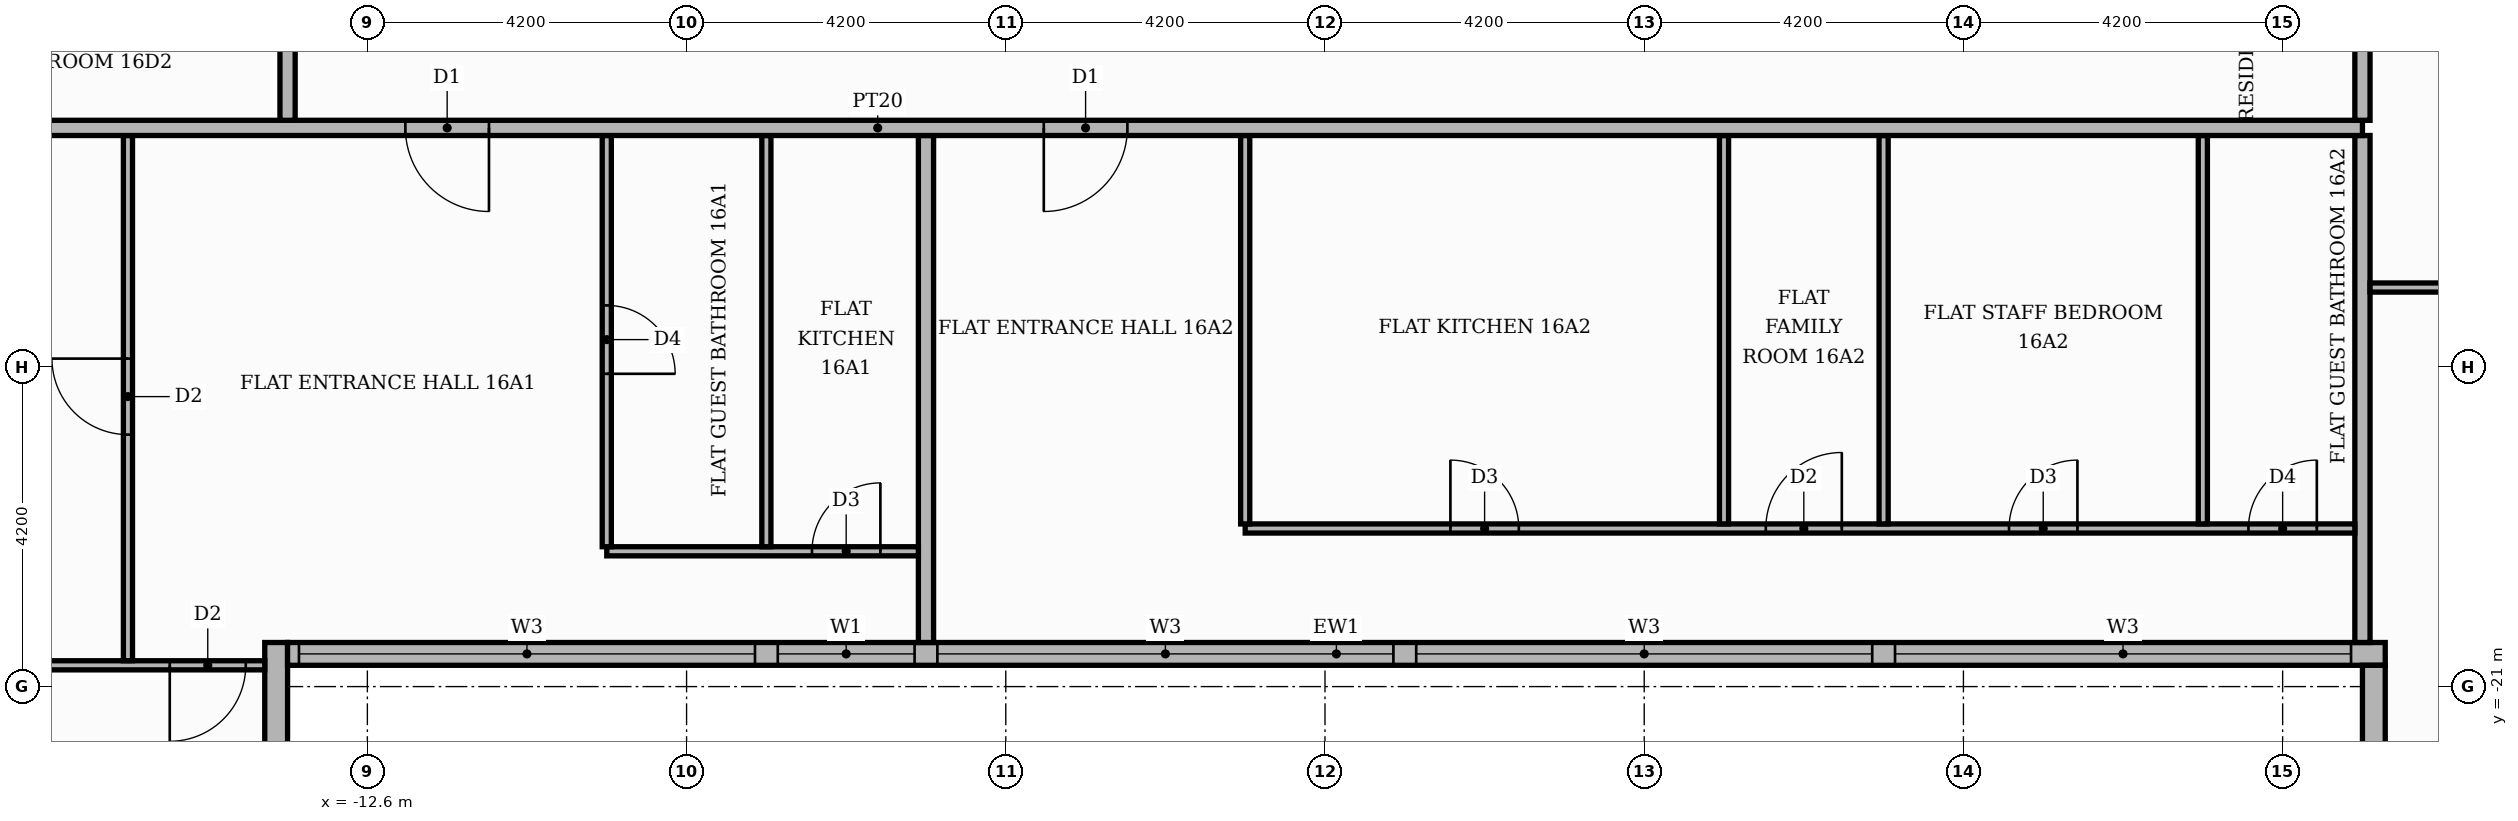
"""IFC4 building model, lengths in metres.
Left out: names, types, materials, properties, quantities, classifications, styles, units other than length and angle.
Written with IfcOpenShell. Run it as: python <this file> out.ifc"""

import sys

from ifc_helpers import new_model, si_unit, direction, frame, frame_2d, origin, place, context, subcontext, project, spatial, rectangle, extrude, element, fill, save


model = new_model("IFC4")
c1 = context("Model", 3, precision=1e-05, world=origin(), true_north=direction((0.0, 1.0)))
c2 = subcontext(c1, "Body", "Model", "MODEL_VIEW")
j1 = project(units=[si_unit("LENGTHUNIT", "METRE"), si_unit("PLANEANGLEUNIT", "RADIAN")], contexts=[c1])
p1 = place(None, origin())
s1 = spatial("IfcSite", under=j1, at=p1, CompositionType="ELEMENT")
p2 = place(p1, origin())
s2 = spatial("IfcBuilding", under=s1, at=p2, CompositionType="ELEMENT")
p3 = place(p2, frame((0.0, 0.0, 69.9)))
s3 = spatial("IfcBuildingStorey", under=s2, at=p3, CompositionType="ELEMENT", Elevation=69.9)
p4 = place(p3, frame((-13.8, -25.42, 0.0), z_axis=(0.0, 0.0, 1.0), x_axis=(0.0, 1.0, 0.0)))
e1 = element("IfcWall", 1, at=p4, inside=s3, PredefinedType="STANDARD", context=c2, shape_type="SweptSolid", body=[
    extrude(rectangle(XDim=5.0, YDim=0.3, at=frame_2d((2.5, 0.0))), origin(), (0.0, 0.0, 1.0), 3.4),
])
p5 = place(p4, frame((1.42, 0.0, 0.9)))
e2 = element("IfcOpeningElement", 2, at=p5, cuts=e1, PredefinedType="OPENING", context=c2, shape_type="SweptSolid", body=[
    extrude(rectangle(XDim=1.8, YDim=2.1, at=frame_2d((0.9, 1.05))), frame((0.0, 0.16, 0.0), z_axis=(0.0, -1.0, 0.0), x_axis=(1.0, 0.0, 0.0)), (0.0, 0.0, 1.0), 0.32),
])
p6 = place(p3, frame((-13.65, -20.57, 0.0), z_axis=(0.0, 0.0, 1.0), x_axis=(1.0, 0.0, 0.0)))
e3 = element("IfcWall", 3, at=p6, inside=s3, PredefinedType="STANDARD", context=c2, shape_type="SweptSolid", body=[
    extrude(rectangle(XDim=27.6, YDim=0.3, at=frame_2d((13.8, 0.0))), origin(), (0.0, 0.0, 1.0), 3.4),
])
p7 = place(p6, frame((0.15, 0.0, 0.9)))
e4 = element("IfcOpeningElement", 4, at=p7, cuts=e3, PredefinedType="OPENING", context=c2, shape_type="SweptSolid", body=[
    extrude(rectangle(XDim=6.0, YDim=2.1, at=frame_2d((3.0, 1.05))), frame((0.0, 0.16, 0.0), z_axis=(0.0, -1.0, 0.0), x_axis=(1.0, 0.0, 0.0)), (0.0, 0.0, 1.0), 0.32),
])
p8 = place(p6, frame((6.45, 0.0, 0.9)))
e5 = element("IfcOpeningElement", 5, at=p8, cuts=e3, PredefinedType="OPENING", context=c2, shape_type="SweptSolid", body=[
    extrude(rectangle(XDim=1.8, YDim=2.1, at=frame_2d((0.9, 1.05))), frame((0.0, 0.16, 0.0), z_axis=(0.0, -1.0, 0.0), x_axis=(1.0, 0.0, 0.0)), (0.0, 0.0, 1.0), 0.32),
])
p9 = place(p6, frame((8.55, 0.0, 0.9)))
e6 = element("IfcOpeningElement", 6, at=p9, cuts=e3, PredefinedType="OPENING", context=c2, shape_type="SweptSolid", body=[
    extrude(rectangle(XDim=6.0, YDim=2.1, at=frame_2d((3.0, 1.05))), frame((0.0, 0.16, 0.0), z_axis=(0.0, -1.0, 0.0), x_axis=(1.0, 0.0, 0.0)), (0.0, 0.0, 1.0), 0.32),
])
p10 = place(p6, frame((14.85, 0.0, 0.9)))
e7 = element("IfcOpeningElement", 7, at=p10, cuts=e3, PredefinedType="OPENING", context=c2, shape_type="SweptSolid", body=[
    extrude(rectangle(XDim=6.0, YDim=2.1, at=frame_2d((3.0, 1.05))), frame((0.0, 0.16, 0.0), z_axis=(0.0, -1.0, 0.0), x_axis=(1.0, 0.0, 0.0)), (0.0, 0.0, 1.0), 0.32),
])
p11 = place(p6, frame((21.15, 0.0, 0.9)))
e8 = element("IfcOpeningElement", 8, at=p11, cuts=e3, PredefinedType="OPENING", context=c2, shape_type="SweptSolid", body=[
    extrude(rectangle(XDim=6.0, YDim=2.1, at=frame_2d((3.0, 1.05))), frame((0.0, 0.16, 0.0), z_axis=(0.0, -1.0, 0.0), x_axis=(1.0, 0.0, 0.0)), (0.0, 0.0, 1.0), 0.32),
])
p12 = place(p3, frame((13.8, -20.72, 0.0), z_axis=(0.0, 0.0, 1.0), x_axis=(0.0, -1.0, 0.0)))
e9 = element("IfcWall", 9, at=p12, inside=s3, PredefinedType="STANDARD", context=c2, shape_type="SweptSolid", body=[
    extrude(rectangle(XDim=5.0, YDim=0.3, at=frame_2d((2.5, 0.0))), origin(), (0.0, 0.0, 1.0), 3.4),
])
p13 = place(p12, frame((1.48, 0.0, 0.9)))
e10 = element("IfcOpeningElement", 10, at=p13, cuts=e9, PredefinedType="OPENING", context=c2, shape_type="SweptSolid", body=[
    extrude(rectangle(XDim=1.8, YDim=2.1, at=frame_2d((0.9, 1.05))), frame((0.0, 0.16, 0.0), z_axis=(0.0, -1.0, 0.0), x_axis=(1.0, 0.0, 0.0)), (0.0, 0.0, 1.0), 0.32),
])
p14 = place(p3, frame((-25.42, -20.72, 0.0), z_axis=(0.0, 0.0, 1.0), x_axis=(1.0, 0.0, 0.0)))
e11 = element("IfcWall", 11, at=p14, inside=s3, PredefinedType="PARTITIONING", context=c2, shape_type="SweptSolid", body=[
    extrude(rectangle(XDim=11.47, YDim=0.12, at=frame_2d((5.735, 0.0))), origin(), (0.0, 0.0, 1.0), 3.4),
])
p15 = place(p14, frame((10.22, 0.0, 0.0)))
e12 = element("IfcOpeningElement", 12, at=p15, cuts=e11, PredefinedType="OPENING", context=c2, shape_type="SweptSolid", body=[
    extrude(rectangle(XDim=1.0, YDim=2.1, at=frame_2d((0.5, 1.05))), frame((0.0, 0.07, 0.0), z_axis=(0.0, -1.0, 0.0), x_axis=(1.0, 0.0, 0.0)), (0.0, 0.0, 1.0), 0.14),
])
for number, where, z_axis, x_axis in (
    (13, (-5.25, -20.42, 0.0), (0.0, 0.0, 1.0), (0.0, 1.0, 0.0)),
    (14, (13.65, -20.42, 0.0), (0.0, 0.0, 1.0), (0.0, 1.0, 0.0)),
):
    element("IfcWall", number, at=place(p3, frame(where, z_axis=z_axis, x_axis=x_axis)), inside=s3, PredefinedType="PARTITIONING", context=c2, shape_type="SweptSolid", body=[
        extrude(rectangle(XDim=6.67, YDim=0.2, at=frame_2d((3.335, 0.0))), origin(), (0.0, 0.0, 1.0), 3.4),
    ])
p16 = place(p3, frame((-15.75, -20.66, 0.0), z_axis=(0.0, 0.0, 1.0), x_axis=(0.0, 1.0, 0.0)))
e15 = element("IfcWall", 15, at=p16, inside=s3, PredefinedType="PARTITIONING", context=c2, shape_type="SweptSolid", body=[
    extrude(rectangle(XDim=6.91, YDim=0.12, at=frame_2d((3.455, 0.0))), origin(), (0.0, 0.0, 1.0), 3.4),
])
p17 = place(p16, frame((2.975, 0.0, 0.0)))
e16 = element("IfcOpeningElement", 16, at=p17, cuts=e15, PredefinedType="OPENING", context=c2, shape_type="SweptSolid", body=[
    extrude(rectangle(XDim=1.0, YDim=2.1, at=frame_2d((0.5, 1.05))), frame((0.0, 0.07, 0.0), z_axis=(0.0, -1.0, 0.0), x_axis=(1.0, 0.0, 0.0)), (0.0, 0.0, 1.0), 0.14),
])
p18 = place(p3, frame((-9.45, -19.22, 0.0), z_axis=(0.0, 0.0, 1.0), x_axis=(1.0, 0.0, 0.0)))
e17 = element("IfcWall", 17, at=p18, inside=s3, PredefinedType="PARTITIONING", context=c2, shape_type="SweptSolid", body=[
    extrude(rectangle(XDim=4.1, YDim=0.12, at=frame_2d((2.05, 0.0))), origin(), (0.0, 0.0, 1.0), 3.4),
])
p19 = place(p18, frame((2.7, 0.0, 0.0)))
e18 = element("IfcOpeningElement", 18, at=p19, cuts=e17, PredefinedType="OPENING", context=c2, shape_type="SweptSolid", body=[
    extrude(rectangle(XDim=0.9, YDim=2.1, at=frame_2d((0.45, 1.05))), frame((0.0, 0.07, 0.0), z_axis=(0.0, -1.0, 0.0), x_axis=(1.0, 0.0, 0.0)), (0.0, 0.0, 1.0), 0.14),
])
p20 = place(p3, frame((-9.45, -19.16, 0.0), z_axis=(0.0, 0.0, 1.0), x_axis=(0.0, 1.0, 0.0)))
e19 = element("IfcWall", 19, at=p20, inside=s3, PredefinedType="PARTITIONING", context=c2, shape_type="SweptSolid", body=[
    extrude(rectangle(XDim=5.41, YDim=0.12, at=frame_2d((2.705, 0.0))), origin(), (0.0, 0.0, 1.0), 3.4),
])
p21 = place(p20, frame((2.275, 0.0, 0.0)))
e20 = element("IfcOpeningElement", 20, at=p21, cuts=e19, PredefinedType="OPENING", context=c2, shape_type="SweptSolid", body=[
    extrude(rectangle(XDim=0.9, YDim=2.1, at=frame_2d((0.45, 1.05))), frame((0.0, 0.07, 0.0), z_axis=(0.0, -1.0, 0.0), x_axis=(1.0, 0.0, 0.0)), (0.0, 0.0, 1.0), 0.14),
])
p22 = place(p3, frame((-7.35, -19.16, 0.0), z_axis=(0.0, 0.0, 1.0), x_axis=(0.0, 1.0, 0.0)))
e21 = element("IfcWall", 21, at=p22, inside=s3, PredefinedType="PARTITIONING", context=c2, shape_type="SweptSolid", body=[
    extrude(rectangle(XDim=5.41, YDim=0.12, at=frame_2d((2.705, 0.0))), origin(), (0.0, 0.0, 1.0), 3.4),
])
p23 = place(p3, frame((-1.05, -18.92, 0.0), z_axis=(0.0, 0.0, 1.0), x_axis=(1.0, 0.0, 0.0)))
e22 = element("IfcWall", 22, at=p23, inside=s3, PredefinedType="PARTITIONING", context=c2, shape_type="SweptSolid", body=[
    extrude(rectangle(XDim=14.6, YDim=0.12, at=frame_2d((7.3, 0.0))), origin(), (0.0, 0.0, 1.0), 3.4),
])
p24 = place(p23, frame((2.7, 0.0, 0.0)))
e23 = element("IfcOpeningElement", 23, at=p24, cuts=e22, PredefinedType="OPENING", context=c2, shape_type="SweptSolid", body=[
    extrude(rectangle(XDim=0.9, YDim=2.1, at=frame_2d((0.45, 1.05))), frame((0.0, 0.07, 0.0), z_axis=(0.0, -1.0, 0.0), x_axis=(1.0, 0.0, 0.0)), (0.0, 0.0, 1.0), 0.14),
])
p25 = place(p23, frame((6.85, 0.0, 0.0)))
e24 = element("IfcOpeningElement", 24, at=p25, cuts=e22, PredefinedType="OPENING", context=c2, shape_type="SweptSolid", body=[
    extrude(rectangle(XDim=1.0, YDim=2.1, at=frame_2d((0.5, 1.05))), frame((0.0, 0.07, 0.0), z_axis=(0.0, -1.0, 0.0), x_axis=(1.0, 0.0, 0.0)), (0.0, 0.0, 1.0), 0.14),
])
p26 = place(p23, frame((10.05, 0.0, 0.0)))
e25 = element("IfcOpeningElement", 25, at=p26, cuts=e22, PredefinedType="OPENING", context=c2, shape_type="SweptSolid", body=[
    extrude(rectangle(XDim=0.9, YDim=2.1, at=frame_2d((0.45, 1.05))), frame((0.0, 0.07, 0.0), z_axis=(0.0, -1.0, 0.0), x_axis=(1.0, 0.0, 0.0)), (0.0, 0.0, 1.0), 0.14),
])
p27 = place(p23, frame((13.2, 0.0, 0.0)))
e26 = element("IfcOpeningElement", 26, at=p27, cuts=e22, PredefinedType="OPENING", context=c2, shape_type="SweptSolid", body=[
    extrude(rectangle(XDim=0.9, YDim=2.1, at=frame_2d((0.45, 1.05))), frame((0.0, 0.07, 0.0), z_axis=(0.0, -1.0, 0.0), x_axis=(1.0, 0.0, 0.0)), (0.0, 0.0, 1.0), 0.14),
])
for number, where, z_axis, x_axis in (
    (27, (-1.05, -18.86, 0.0), (0.0, 0.0, 1.0), (0.0, 1.0, 0.0)),
    (28, (5.25, -18.86, 0.0), (0.0, 0.0, 1.0), (0.0, 1.0, 0.0)),
    (29, (7.35, -18.86, 0.0), (0.0, 0.0, 1.0), (0.0, 1.0, 0.0)),
    (30, (11.55, -18.86, 0.0), (0.0, 0.0, 1.0), (0.0, 1.0, 0.0)),
):
    element("IfcWall", number, at=place(p3, frame(where, z_axis=z_axis, x_axis=x_axis)), inside=s3, PredefinedType="PARTITIONING", context=c2, shape_type="SweptSolid", body=[
        extrude(rectangle(XDim=5.11, YDim=0.12, at=frame_2d((2.555, 0.0))), origin(), (0.0, 0.0, 1.0), 3.4),
    ])
p28 = place(p3, frame((13.75, -15.75, 0.0), z_axis=(0.0, 0.0, 1.0), x_axis=(1.0, 0.0, 0.0)))
e31 = element("IfcWall", 31, at=p28, inside=s3, PredefinedType="PARTITIONING", context=c2, shape_type="SweptSolid", body=[
    extrude(rectangle(XDim=6.07, YDim=0.12, at=frame_2d((3.035, 0.0))), origin(), (0.0, 0.0, 1.0), 3.4),
])
p29 = place(p28, frame((2.485, 0.0, 0.0)))
e32 = element("IfcOpeningElement", 32, at=p29, cuts=e31, PredefinedType="OPENING", context=c2, shape_type="SweptSolid", body=[
    extrude(rectangle(XDim=1.0, YDim=2.1, at=frame_2d((0.5, 1.05))), frame((0.0, 0.07, 0.0), z_axis=(0.0, -1.0, 0.0), x_axis=(1.0, 0.0, 0.0)), (0.0, 0.0, 1.0), 0.14),
])
p30 = place(p3, frame((-25.42, -13.65, 0.0), z_axis=(0.0, 0.0, 1.0), x_axis=(1.0, 0.0, 0.0)))
e33 = element("IfcWall", 33, at=p30, inside=s3, PredefinedType="PARTITIONING", context=c2, shape_type="SweptSolid", body=[
    extrude(rectangle(XDim=39.07, YDim=0.2, at=frame_2d((19.535, 0.0))), origin(), (0.0, 0.0, 1.0), 3.4),
])
p31 = place(p30, frame((13.32, 0.0, 0.0)))
e34 = element("IfcOpeningElement", 34, at=p31, cuts=e33, PredefinedType="OPENING", context=c2, shape_type="SweptSolid", body=[
    extrude(rectangle(XDim=1.1, YDim=2.4, at=frame_2d((0.55, 1.2))), frame((0.0, 0.11, 0.0), z_axis=(0.0, -1.0, 0.0), x_axis=(1.0, 0.0, 0.0)), (0.0, 0.0, 1.0), 0.22),
])
p32 = place(p30, frame((21.72, 0.0, 0.0)))
e35 = element("IfcOpeningElement", 35, at=p32, cuts=e33, PredefinedType="OPENING", context=c2, shape_type="SweptSolid", body=[
    extrude(rectangle(XDim=1.1, YDim=2.4, at=frame_2d((0.55, 1.2))), frame((0.0, 0.11, 0.0), z_axis=(0.0, -1.0, 0.0), x_axis=(1.0, 0.0, 0.0)), (0.0, 0.0, 1.0), 0.22),
])
p33 = place(p3, frame((-13.65, -13.55, 0.0), z_axis=(0.0, 0.0, 1.0), x_axis=(0.0, 1.0, 0.0)))
e36 = element("IfcWall", 36, at=p33, inside=s3, PredefinedType="PARTITIONING", context=c2, shape_type="SweptSolid", body=[
    extrude(rectangle(XDim=18.7, YDim=0.2, at=frame_2d((9.35, 0.0))), origin(), (0.0, 0.0, 1.0), 3.4),
])
p34 = place(p33, frame((11.95, 0.0, 0.0)))
e37 = element("IfcOpeningElement", 37, at=p34, cuts=e36, PredefinedType="OPENING", context=c2, shape_type="SweptSolid", body=[
    extrude(rectangle(XDim=1.1, YDim=2.4, at=frame_2d((0.55, 1.2))), frame((0.0, 0.11, 0.0), z_axis=(0.0, -1.0, 0.0), x_axis=(1.0, 0.0, 0.0)), (0.0, 0.0, 1.0), 0.22),
])
p35 = place(p3, frame((13.65, -13.55, 0.0), z_axis=(0.0, 0.0, 1.0), x_axis=(0.0, 1.0, 0.0)))
e38 = element("IfcWall", 38, at=p35, inside=s3, PredefinedType="PARTITIONING", context=c2, shape_type="SweptSolid", body=[
    extrude(rectangle(XDim=8.2, YDim=0.2, at=frame_2d((4.1, 0.0))), origin(), (0.0, 0.0, 1.0), 3.4),
])
p36 = place(p35, frame((1.45, 0.0, 0.0)))
e39 = element("IfcOpeningElement", 39, at=p36, cuts=e38, PredefinedType="OPENING", context=c2, shape_type="SweptSolid", body=[
    extrude(rectangle(XDim=1.1, YDim=2.4, at=frame_2d((0.55, 1.2))), frame((0.0, 0.11, 0.0), z_axis=(0.0, -1.0, 0.0), x_axis=(1.0, 0.0, 0.0)), (0.0, 0.0, 1.0), 0.22),
])
p37 = place(p7, origin())
e40 = element("IfcWindow", 40, at=p37, inside=s3, PartitioningType="SINGLE_PANEL", PredefinedType="WINDOW", context=c2, shape_type="SweptSolid", body=[
    extrude(rectangle(XDim=6.0, YDim=2.1, at=frame_2d((3.0, 1.05))), frame((0.0, 0.03, 0.0), z_axis=(0.0, -1.0, 0.0), x_axis=(1.0, 0.0, 0.0)), (0.0, 0.0, 1.0), 0.06),
])
fill(e4, e40)
p38 = place(p8, origin())
e41 = element("IfcWindow", 41, at=p38, inside=s3, PartitioningType="SINGLE_PANEL", PredefinedType="WINDOW", context=c2, shape_type="SweptSolid", body=[
    extrude(rectangle(XDim=1.8, YDim=2.1, at=frame_2d((0.9, 1.05))), frame((0.0, 0.03, 0.0), z_axis=(0.0, -1.0, 0.0), x_axis=(1.0, 0.0, 0.0)), (0.0, 0.0, 1.0), 0.06),
])
fill(e5, e41)
p39 = place(p9, origin())
e42 = element("IfcWindow", 42, at=p39, inside=s3, PartitioningType="SINGLE_PANEL", PredefinedType="WINDOW", context=c2, shape_type="SweptSolid", body=[
    extrude(rectangle(XDim=6.0, YDim=2.1, at=frame_2d((3.0, 1.05))), frame((0.0, 0.03, 0.0), z_axis=(0.0, -1.0, 0.0), x_axis=(1.0, 0.0, 0.0)), (0.0, 0.0, 1.0), 0.06),
])
fill(e6, e42)
p40 = place(p10, origin())
e43 = element("IfcWindow", 43, at=p40, inside=s3, PartitioningType="SINGLE_PANEL", PredefinedType="WINDOW", context=c2, shape_type="SweptSolid", body=[
    extrude(rectangle(XDim=6.0, YDim=2.1, at=frame_2d((3.0, 1.05))), frame((0.0, 0.03, 0.0), z_axis=(0.0, -1.0, 0.0), x_axis=(1.0, 0.0, 0.0)), (0.0, 0.0, 1.0), 0.06),
])
fill(e7, e43)
p41 = place(p11, origin())
e44 = element("IfcWindow", 44, at=p41, inside=s3, PartitioningType="SINGLE_PANEL", PredefinedType="WINDOW", context=c2, shape_type="SweptSolid", body=[
    extrude(rectangle(XDim=6.0, YDim=2.1, at=frame_2d((3.0, 1.05))), frame((0.0, 0.03, 0.0), z_axis=(0.0, -1.0, 0.0), x_axis=(1.0, 0.0, 0.0)), (0.0, 0.0, 1.0), 0.06),
])
fill(e8, e44)
p42 = place(p31, frame((1.1, 0.0, 0.0), z_axis=(0.0, 0.0, 1.0), x_axis=(-1.0, 0.0, 0.0)))
e45 = element("IfcDoor", 45, at=p42, inside=s3, OperationType="SINGLE_SWING_RIGHT", PredefinedType="DOOR", context=c2, shape_type="SweptSolid", body=[
    extrude(rectangle(XDim=1.1, YDim=2.4, at=frame_2d((0.55, 1.2))), frame((0.0, 0.025, 0.0), z_axis=(0.0, -1.0, 0.0), x_axis=(1.0, 0.0, 0.0)), (0.0, 0.0, 1.0), 0.05),
])
fill(e34, e45)
p43 = place(p17, origin())
e46 = element("IfcDoor", 46, at=p43, inside=s3, OperationType="SINGLE_SWING_RIGHT", PredefinedType="DOOR", context=c2, shape_type="SweptSolid", body=[
    extrude(rectangle(XDim=1.0, YDim=2.1, at=frame_2d((0.5, 1.05))), frame((0.0, 0.025, 0.0), z_axis=(0.0, -1.0, 0.0), x_axis=(1.0, 0.0, 0.0)), (0.0, 0.0, 1.0), 0.05),
])
fill(e16, e46)
p44 = place(p21, frame((0.9, 0.0, 0.0), z_axis=(0.0, 0.0, 1.0), x_axis=(-1.0, 0.0, 0.0)))
e47 = element("IfcDoor", 47, at=p44, inside=s3, OperationType="SINGLE_SWING_LEFT", PredefinedType="DOOR", context=c2, shape_type="SweptSolid", body=[
    extrude(rectangle(XDim=0.9, YDim=2.1, at=frame_2d((0.45, 1.05))), frame((0.0, 0.025, 0.0), z_axis=(0.0, -1.0, 0.0), x_axis=(1.0, 0.0, 0.0)), (0.0, 0.0, 1.0), 0.05),
])
fill(e20, e47)
p45 = place(p19, origin())
e48 = element("IfcDoor", 48, at=p45, inside=s3, OperationType="SINGLE_SWING_RIGHT", PredefinedType="DOOR", context=c2, shape_type="SweptSolid", body=[
    extrude(rectangle(XDim=0.9, YDim=2.1, at=frame_2d((0.45, 1.05))), frame((0.0, 0.025, 0.0), z_axis=(0.0, -1.0, 0.0), x_axis=(1.0, 0.0, 0.0)), (0.0, 0.0, 1.0), 0.05),
])
fill(e18, e48)
p46 = place(p15, frame((1.0, 0.0, 0.0), z_axis=(0.0, 0.0, 1.0), x_axis=(-1.0, 0.0, 0.0)))
e49 = element("IfcDoor", 49, at=p46, inside=s3, OperationType="SINGLE_SWING_LEFT", PredefinedType="DOOR", context=c2, shape_type="SweptSolid", body=[
    extrude(rectangle(XDim=1.0, YDim=2.1, at=frame_2d((0.5, 1.05))), frame((0.0, 0.025, 0.0), z_axis=(0.0, -1.0, 0.0), x_axis=(1.0, 0.0, 0.0)), (0.0, 0.0, 1.0), 0.05),
])
fill(e12, e49)
p47 = place(p32, frame((1.1, 0.0, 0.0), z_axis=(0.0, 0.0, 1.0), x_axis=(-1.0, 0.0, 0.0)))
e50 = element("IfcDoor", 50, at=p47, inside=s3, OperationType="SINGLE_SWING_LEFT", PredefinedType="DOOR", context=c2, shape_type="SweptSolid", body=[
    extrude(rectangle(XDim=1.1, YDim=2.4, at=frame_2d((0.55, 1.2))), frame((0.0, 0.025, 0.0), z_axis=(0.0, -1.0, 0.0), x_axis=(1.0, 0.0, 0.0)), (0.0, 0.0, 1.0), 0.05),
])
fill(e35, e50)
p48 = place(p24, origin())
e51 = element("IfcDoor", 51, at=p48, inside=s3, OperationType="SINGLE_SWING_LEFT", PredefinedType="DOOR", context=c2, shape_type="SweptSolid", body=[
    extrude(rectangle(XDim=0.9, YDim=2.1, at=frame_2d((0.45, 1.05))), frame((0.0, 0.025, 0.0), z_axis=(0.0, -1.0, 0.0), x_axis=(1.0, 0.0, 0.0)), (0.0, 0.0, 1.0), 0.05),
])
fill(e23, e51)
p49 = place(p25, origin())
e52 = element("IfcDoor", 52, at=p49, inside=s3, OperationType="SINGLE_SWING_RIGHT", PredefinedType="DOOR", context=c2, shape_type="SweptSolid", body=[
    extrude(rectangle(XDim=1.0, YDim=2.1, at=frame_2d((0.5, 1.05))), frame((0.0, 0.025, 0.0), z_axis=(0.0, -1.0, 0.0), x_axis=(1.0, 0.0, 0.0)), (0.0, 0.0, 1.0), 0.05),
])
fill(e24, e52)
p50 = place(p26, origin())
e53 = element("IfcDoor", 53, at=p50, inside=s3, OperationType="SINGLE_SWING_RIGHT", PredefinedType="DOOR", context=c2, shape_type="SweptSolid", body=[
    extrude(rectangle(XDim=0.9, YDim=2.1, at=frame_2d((0.45, 1.05))), frame((0.0, 0.025, 0.0), z_axis=(0.0, -1.0, 0.0), x_axis=(1.0, 0.0, 0.0)), (0.0, 0.0, 1.0), 0.05),
])
fill(e25, e53)
p51 = place(p27, origin())
e54 = element("IfcDoor", 54, at=p51, inside=s3, OperationType="SINGLE_SWING_RIGHT", PredefinedType="DOOR", context=c2, shape_type="SweptSolid", body=[
    extrude(rectangle(XDim=0.9, YDim=2.1, at=frame_2d((0.45, 1.05))), frame((0.0, 0.025, 0.0), z_axis=(0.0, -1.0, 0.0), x_axis=(1.0, 0.0, 0.0)), (0.0, 0.0, 1.0), 0.05),
])
fill(e26, e54)
save(model, sys.argv[1])
